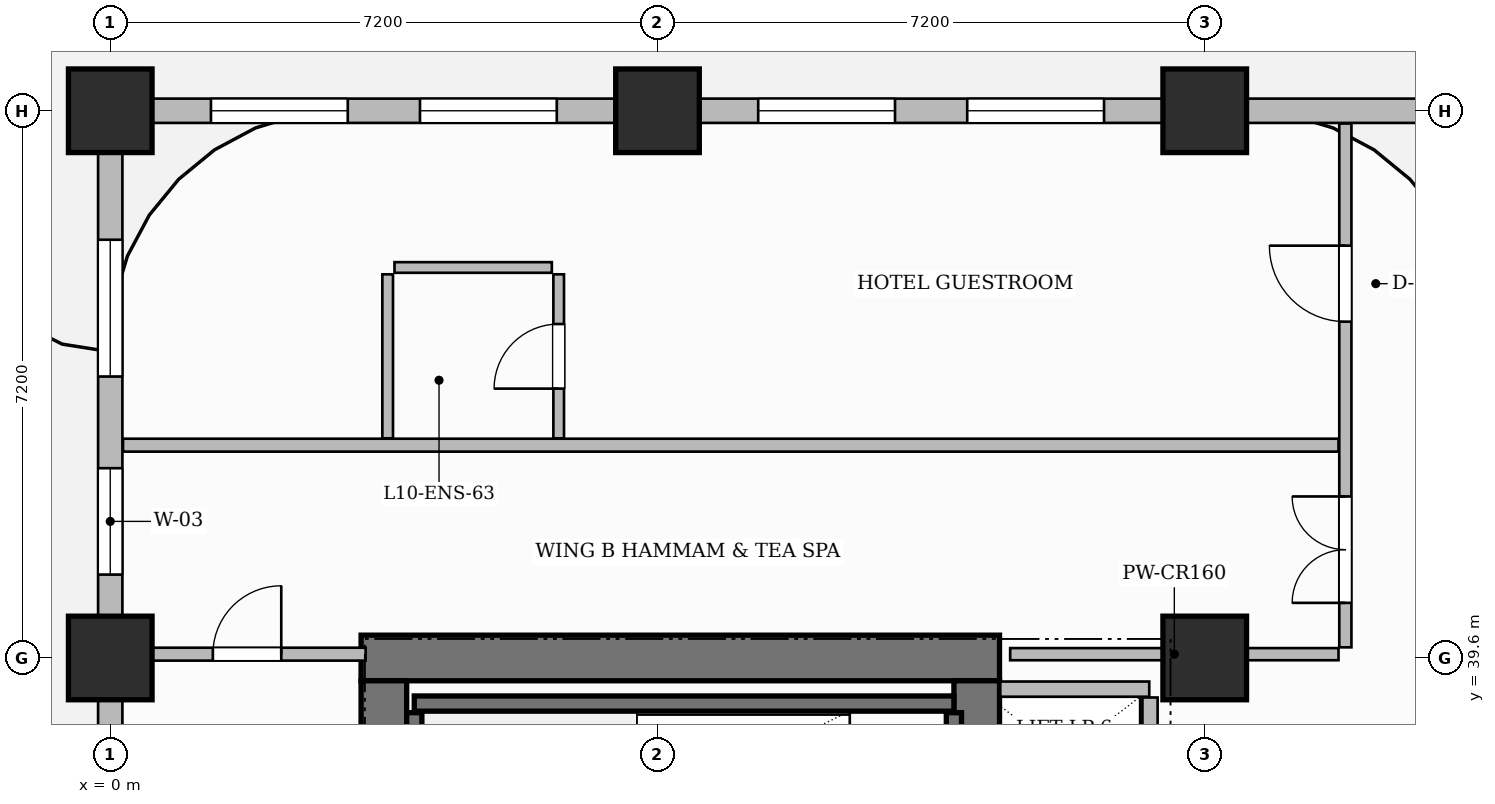
"""IFC4 building model, lengths in metres.
Left out: names, types, materials, properties, quantities, classifications, styles, units other than length and angle.
Written with IfcOpenShell. Run it as: python <this file> out.ifc"""

import sys

from ifc_helpers import new_model, si_unit, direction, frame, frame_2d, origin, origin_2d, place, context, subcontext, project, spatial, rectangle, extrude, source, transform, mapped, element, fill, save


model = new_model("IFC4")
c1 = context("Model", 3, precision=1e-05, world=origin(), true_north=direction((0.0, 1.0)))
c2 = subcontext(c1, "Body", "Model", "MODEL_VIEW")
j1 = project(units=[si_unit("LENGTHUNIT", "METRE"), si_unit("PLANEANGLEUNIT", "RADIAN")], contexts=[c1])
p1 = place(None, origin())
s1 = spatial("IfcSite", under=j1, at=p1, CompositionType="ELEMENT")
p2 = place(p1, origin())
s2 = spatial("IfcBuilding", under=s1, at=p2, CompositionType="ELEMENT")
p3 = place(p2, frame((0.0, 0.0, 47.2)))
s3 = spatial("IfcBuildingStorey", under=s2, at=p3, CompositionType="ELEMENT", Elevation=47.2)
p4 = place(p3, frame((3.3, 39.6, 0.0), z_axis=(0.0, 0.0, 1.0), x_axis=(1.0, 0.0, 0.0)))
e1 = element("IfcWall", 1, at=p4, inside=s3, PredefinedType="SHEAR", context=c2, shape_type="SweptSolid", body=[
    extrude(rectangle(XDim=8.4, YDim=0.6, at=frame_2d((4.2, 0.0))), origin(), (0.0, 0.0, 1.0), 3.7),
])
p5 = place(p3, frame((3.6, 25.5, 0.0), z_axis=(0.0, 0.0, 1.0), x_axis=(0.0, 1.0, 0.0)))
e2 = element("IfcWall", 2, at=p5, inside=s3, PredefinedType="SHEAR", context=c2, shape_type="SweptSolid", body=[
    extrude(rectangle(XDim=13.8, YDim=0.6, at=frame_2d((6.9, 0.0))), origin(), (0.0, 0.0, 1.0), 3.7),
])
p6 = place(p3, frame((11.4, 25.5, 0.0), z_axis=(0.0, 0.0, 1.0), x_axis=(0.0, 1.0, 0.0)))
e3 = element("IfcWall", 3, at=p6, inside=s3, PredefinedType="SHEAR", context=c2, shape_type="SweptSolid", body=[
    extrude(rectangle(XDim=13.8, YDim=0.6, at=frame_2d((6.9, 0.0))), origin(), (0.0, 0.0, 1.0), 3.7),
])
p7 = place(p6, frame((6.47, 0.0, 0.0)))
e4 = element("IfcOpeningElement", 4, at=p7, cuts=e3, PredefinedType="OPENING", context=c2, shape_type="SweptSolid", body=[
    extrude(rectangle(XDim=1.5, YDim=2.2, at=frame_2d((0.75, 1.1))), frame((0.0, 0.31, 0.0), z_axis=(0.0, -1.0, 0.0), x_axis=(1.0, 0.0, 0.0)), (0.0, 0.0, 1.0), 0.62),
])
m1 = source(origin(), c2, "Body", "SweptSolid", [
    extrude(rectangle(XDim=1.1, YDim=1.1, at=origin_2d()), origin(), (0.0, 0.0, 1.0), 3.7),
])
for number, where, z_axis, x_axis in (
    (5, (0.0, 39.6, 0.0), (0.0, 0.0, 1.0), (1.0, 0.0, 0.0)),
    (6, (0.0, 46.8, 0.0), (0.0, 0.0, 1.0), (1.0, 0.0, 0.0)),
    (7, (7.2, 46.8, 0.0), (0.0, 0.0, 1.0), (1.0, 0.0, 0.0)),
    (8, (14.4, 39.6, 0.0), (0.0, 0.0, 1.0), (1.0, 0.0, 0.0)),
    (9, (14.4, 46.8, 0.0), (0.0, 0.0, 1.0), (1.0, 0.0, 0.0)),
):
    element("IfcColumn", number, at=place(p3, frame(where, z_axis=z_axis, x_axis=x_axis)), inside=s3, PredefinedType="COLUMN", context=c2, shape_type="MappedRepresentation", body=[
        mapped(m1, transform((0.0, 0.0, 0.0), scale=1.0)),
    ])
p8 = place(p3, frame((4.0, 39.0, 0.0), z_axis=(0.0, 0.0, 1.0), x_axis=(1.0, 0.0, 0.0)))
e10 = element("IfcWall", 10, at=p8, inside=s3, PredefinedType="SHEAR", context=c2, shape_type="SweptSolid", body=[
    extrude(rectangle(XDim=7.1, YDim=0.2, at=frame_2d((3.55, 0.0))), origin(), (0.0, 0.0, 1.0), 3.7),
])
for number, where, z_axis, x_axis in (
    (11, (4.0, 36.18, 0.0), (0.0, 0.0, 1.0), (0.0, 1.0, 0.0)),
    (12, (11.1, 36.18, 0.0), (0.0, 0.0, 1.0), (0.0, 1.0, 0.0)),
):
    element("IfcWall", number, at=place(p3, frame(where, z_axis=z_axis, x_axis=x_axis)), inside=s3, PredefinedType="SHEAR", context=c2, shape_type="SweptSolid", body=[
        extrude(rectangle(XDim=2.7, YDim=0.2, at=frame_2d((1.35, 0.0))), origin(), (0.0, 0.0, 1.0), 3.7),
    ])
p9 = place(p3, frame((11.71, 39.19, 0.0), z_axis=(0.0, 0.0, 1.0), x_axis=(1.0, 0.0, 0.0)))
e13 = element("IfcWall", 13, at=p9, inside=s3, PredefinedType="PARTITIONING", context=c2, shape_type="SweptSolid", body=[
    extrude(rectangle(XDim=1.96, YDim=0.2, at=frame_2d((0.98, 0.0))), origin(), (0.0, 0.0, 1.0), 3.45),
])
p10 = place(p3, frame((13.68, 34.36, 0.0), z_axis=(0.0, 0.0, 1.0), x_axis=(0.0, 1.0, 0.0)))
e14 = element("IfcWall", 14, at=p10, inside=s3, PredefinedType="PARTITIONING", context=c2, shape_type="SweptSolid", body=[
    extrude(rectangle(XDim=4.72, YDim=0.2, at=frame_2d((2.36, 0.0))), origin(), (0.0, 0.0, 1.0), 3.45),
])
p11 = place(p3, frame((16.25, 39.74, 0.0), z_axis=(0.0, 0.0, 1.0), x_axis=(0.0, 1.0, 0.0)))
e15 = element("IfcWall", 15, at=p11, inside=s3, PredefinedType="PARTITIONING", context=c2, shape_type="SweptSolid", body=[
    extrude(rectangle(XDim=6.892, YDim=0.16, at=frame_2d((3.446, 0.0))), origin(), (0.0, 0.0, 1.0), 3.45),
])
p12 = place(p11, frame((0.585, 0.0, 0.0)))
e16 = element("IfcOpeningElement", 16, at=p12, cuts=e15, PredefinedType="OPENING", context=c2, shape_type="SweptSolid", body=[
    extrude(rectangle(XDim=1.4, YDim=2.35, at=frame_2d((0.7, 1.175))), frame((0.0, 0.09, 0.0), z_axis=(0.0, -1.0, 0.0), x_axis=(1.0, 0.0, 0.0)), (0.0, 0.0, 1.0), 0.18),
])
p13 = place(p11, frame((4.285, 0.0, 0.0)))
e17 = element("IfcOpeningElement", 17, at=p13, cuts=e15, PredefinedType="OPENING", context=c2, shape_type="SweptSolid", body=[
    extrude(rectangle(XDim=1.0, YDim=2.2, at=frame_2d((0.5, 1.1))), frame((0.0, 0.09, 0.0), z_axis=(0.0, -1.0, 0.0), x_axis=(1.0, 0.0, 0.0)), (0.0, 0.0, 1.0), 0.18),
])
p14 = place(p3, frame((11.84, 39.65, 0.0), z_axis=(0.0, 0.0, 1.0), x_axis=(1.0, 0.0, 0.0)))
e18 = element("IfcWall", 18, at=p14, inside=s3, PredefinedType="PARTITIONING", context=c2, shape_type="SweptSolid", body=[
    extrude(rectangle(XDim=4.32, YDim=0.16, at=frame_2d((2.16, 0.0))), origin(), (0.0, 0.0, 1.0), 2.885),
])
p15 = place(p3, frame((0.24, 39.65, 0.0), z_axis=(0.0, 0.0, 1.0), x_axis=(1.0, 0.0, 0.0)))
e19 = element("IfcWall", 19, at=p15, inside=s3, PredefinedType="PARTITIONING", context=c2, shape_type="SweptSolid", body=[
    extrude(rectangle(XDim=3.12, YDim=0.17, at=frame_2d((1.56, 0.0))), origin(), (0.0, 0.0, 1.0), 3.45),
])
p16 = place(p15, frame((1.11, 0.0, 0.0)))
e20 = element("IfcOpeningElement", 20, at=p16, cuts=e19, PredefinedType="OPENING", context=c2, shape_type="SweptSolid", body=[
    extrude(rectangle(XDim=0.9, YDim=2.15, at=frame_2d((0.45, 1.075))), frame((0.0, 0.095, 0.0), z_axis=(0.0, -1.0, 0.0), x_axis=(1.0, 0.0, 0.0)), (0.0, 0.0, 1.0), 0.19),
])
p17 = place(p3, frame((0.168, 42.4, 0.0), z_axis=(0.0, 0.0, 1.0), x_axis=(1.0, 0.0, 0.0)))
e21 = element("IfcWall", 21, at=p17, inside=s3, PredefinedType="PARTITIONING", context=c2, shape_type="SweptSolid", body=[
    extrude(rectangle(XDim=15.992, YDim=0.17, at=frame_2d((7.996, 0.0))), origin(), (0.0, 0.0, 1.0), 3.45),
])
p18 = place(p3, frame((3.65, 42.49, 0.0), z_axis=(0.0, 0.0, 1.0), x_axis=(0.0, 1.0, 0.0)))
e22 = element("IfcWall", 22, at=p18, inside=s3, PredefinedType="PARTITIONING", context=c2, shape_type="SweptSolid", body=[
    extrude(rectangle(XDim=2.158, YDim=0.14, at=frame_2d((1.079, 0.0))), origin(), (0.0, 0.0, 1.0), 3.45),
])
p19 = place(p3, frame((3.74, 44.738, 0.0), z_axis=(0.0, 0.0, 1.0), x_axis=(1.0, 0.0, 0.0)))
e23 = element("IfcWall", 23, at=p19, inside=s3, PredefinedType="PARTITIONING", context=c2, shape_type="SweptSolid", body=[
    extrude(rectangle(XDim=2.07, YDim=0.14, at=frame_2d((1.035, 0.0))), origin(), (0.0, 0.0, 1.0), 3.45),
])
p20 = place(p3, frame((5.9, 42.49, 0.0), z_axis=(0.0, 0.0, 1.0), x_axis=(0.0, 1.0, 0.0)))
e24 = element("IfcWall", 24, at=p20, inside=s3, PredefinedType="PARTITIONING", context=c2, shape_type="SweptSolid", body=[
    extrude(rectangle(XDim=2.158, YDim=0.14, at=frame_2d((1.079, 0.0))), origin(), (0.0, 0.0, 1.0), 3.45),
])
p21 = place(p20, frame((0.654, 0.0, 0.0)))
e25 = element("IfcOpeningElement", 25, at=p21, cuts=e24, PredefinedType="OPENING", context=c2, shape_type="SweptSolid", body=[
    extrude(rectangle(XDim=0.85, YDim=2.1, at=frame_2d((0.425, 1.05))), frame((0.0, 0.08, 0.0), z_axis=(0.0, -1.0, 0.0), x_axis=(1.0, 0.0, 0.0)), (0.0, 0.0, 1.0), 0.16),
])
p22 = place(p3, frame((0.0, 46.8, 0.0), z_axis=(0.0, 0.0, 1.0), x_axis=(1.0, 0.0, 0.0)))
e26 = element("IfcWall", 26, at=p22, inside=s3, PredefinedType="SOLIDWALL", context=c2, shape_type="SweptSolid", body=[
    extrude(rectangle(XDim=18.0, YDim=0.32, at=frame_2d((9.0, 0.0))), origin(), (0.0, 0.0, 1.0), 2.885),
])
p23 = place(p22, frame((1.325, 0.0, 0.8)))
e27 = element("IfcOpeningElement", 27, at=p23, cuts=e26, PredefinedType="OPENING", context=c2, shape_type="SweptSolid", body=[
    extrude(rectangle(XDim=1.8, YDim=1.85, at=frame_2d((0.9, 0.925))), frame((0.0, 0.17, 0.0), z_axis=(0.0, -1.0, 0.0), x_axis=(1.0, 0.0, 0.0)), (0.0, 0.0, 1.0), 0.34),
])
p24 = place(p22, frame((4.075, 0.0, 0.8)))
e28 = element("IfcOpeningElement", 28, at=p24, cuts=e26, PredefinedType="OPENING", context=c2, shape_type="SweptSolid", body=[
    extrude(rectangle(XDim=1.8, YDim=1.85, at=frame_2d((0.9, 0.925))), frame((0.0, 0.17, 0.0), z_axis=(0.0, -1.0, 0.0), x_axis=(1.0, 0.0, 0.0)), (0.0, 0.0, 1.0), 0.34),
])
p25 = place(p22, frame((8.525, 0.0, 0.8)))
e29 = element("IfcOpeningElement", 29, at=p25, cuts=e26, PredefinedType="OPENING", context=c2, shape_type="SweptSolid", body=[
    extrude(rectangle(XDim=1.8, YDim=1.85, at=frame_2d((0.9, 0.925))), frame((0.0, 0.17, 0.0), z_axis=(0.0, -1.0, 0.0), x_axis=(1.0, 0.0, 0.0)), (0.0, 0.0, 1.0), 0.34),
])
p26 = place(p22, frame((11.275, 0.0, 0.8)))
e30 = element("IfcOpeningElement", 30, at=p26, cuts=e26, PredefinedType="OPENING", context=c2, shape_type="SweptSolid", body=[
    extrude(rectangle(XDim=1.8, YDim=1.85, at=frame_2d((0.9, 0.925))), frame((0.0, 0.17, 0.0), z_axis=(0.0, -1.0, 0.0), x_axis=(1.0, 0.0, 0.0)), (0.0, 0.0, 1.0), 0.34),
])
p27 = place(p3, frame((0.0, 25.25, 0.0), z_axis=(0.0, 0.0, 1.0), x_axis=(0.0, 1.0, 0.0)))
e31 = element("IfcWall", 31, at=p27, inside=s3, PredefinedType="SOLIDWALL", context=c2, shape_type="SweptSolid", body=[
    extrude(rectangle(XDim=21.5, YDim=0.32, at=frame_2d((10.75, 0.0))), origin(), (0.0, 0.0, 1.0), 2.885),
])
p28 = place(p27, frame((1.275, 0.0, 0.8)))
e32 = element("IfcOpeningElement", 32, at=p28, cuts=e31, PredefinedType="OPENING", context=c2, shape_type="SweptSolid", body=[
    extrude(rectangle(XDim=1.8, YDim=1.85, at=frame_2d((0.9, 0.925))), frame((0.0, 0.17, 0.0), z_axis=(0.0, -1.0, 0.0), x_axis=(1.0, 0.0, 0.0)), (0.0, 0.0, 1.0), 0.34),
])
p29 = place(p27, frame((4.025, 0.0, 0.8)))
e33 = element("IfcOpeningElement", 33, at=p29, cuts=e31, PredefinedType="OPENING", context=c2, shape_type="SweptSolid", body=[
    extrude(rectangle(XDim=1.8, YDim=1.85, at=frame_2d((0.9, 0.925))), frame((0.0, 0.17, 0.0), z_axis=(0.0, -1.0, 0.0), x_axis=(1.0, 0.0, 0.0)), (0.0, 0.0, 1.0), 0.34),
])
p30 = place(p27, frame((8.475, 0.0, 0.8)))
e34 = element("IfcOpeningElement", 34, at=p30, cuts=e31, PredefinedType="OPENING", context=c2, shape_type="SweptSolid", body=[
    extrude(rectangle(XDim=1.8, YDim=1.85, at=frame_2d((0.9, 0.925))), frame((0.0, 0.17, 0.0), z_axis=(0.0, -1.0, 0.0), x_axis=(1.0, 0.0, 0.0)), (0.0, 0.0, 1.0), 0.34),
])
p31 = place(p27, frame((11.225, 0.0, 0.8)))
e35 = element("IfcOpeningElement", 35, at=p31, cuts=e31, PredefinedType="OPENING", context=c2, shape_type="SweptSolid", body=[
    extrude(rectangle(XDim=1.8, YDim=1.85, at=frame_2d((0.9, 0.925))), frame((0.0, 0.17, 0.0), z_axis=(0.0, -1.0, 0.0), x_axis=(1.0, 0.0, 0.0)), (0.0, 0.0, 1.0), 0.34),
])
p32 = place(p27, frame((15.447, 0.0, 0.8)))
e36 = element("IfcOpeningElement", 36, at=p32, cuts=e31, PredefinedType="OPENING", context=c2, shape_type="SweptSolid", body=[
    extrude(rectangle(XDim=1.4, YDim=1.85, at=frame_2d((0.7, 0.925))), frame((0.0, 0.17, 0.0), z_axis=(0.0, -1.0, 0.0), x_axis=(1.0, 0.0, 0.0)), (0.0, 0.0, 1.0), 0.34),
])
p33 = place(p27, frame((18.053, 0.0, 0.8)))
e37 = element("IfcOpeningElement", 37, at=p33, cuts=e31, PredefinedType="OPENING", context=c2, shape_type="SweptSolid", body=[
    extrude(rectangle(XDim=1.8, YDim=1.85, at=frame_2d((0.9, 0.925))), frame((0.0, 0.17, 0.0), z_axis=(0.0, -1.0, 0.0), x_axis=(1.0, 0.0, 0.0)), (0.0, 0.0, 1.0), 0.34),
])
m2 = source(origin(), c2, "Body", "SweptSolid", [
    extrude(rectangle(XDim=0.9, YDim=2.15, at=frame_2d((0.45, 1.075))), frame((0.0, 0.025, 0.0), z_axis=(0.0, -1.0, 0.0), x_axis=(1.0, 0.0, 0.0)), (0.0, 0.0, 1.0), 0.05),
])
p34 = place(p16, origin())
e38 = element("IfcDoor", 38, at=p34, inside=s3, OperationType="SINGLE_SWING_RIGHT", PredefinedType="DOOR", context=c2, shape_type="MappedRepresentation", body=[
    mapped(m2, transform((0.0, 0.0, 0.0), scale=1.0)),
])
fill(e20, e38)
m3 = source(origin(), c2, "Body", "SweptSolid", [
    extrude(rectangle(XDim=1.4, YDim=2.35, at=frame_2d((0.7, 1.175))), frame((0.0, 0.025, 0.0), z_axis=(0.0, -1.0, 0.0), x_axis=(1.0, 0.0, 0.0)), (0.0, 0.0, 1.0), 0.05),
])
p35 = place(p12, origin())
e39 = element("IfcDoor", 39, at=p35, inside=s3, OperationType="DOUBLE_DOOR_SINGLE_SWING", PredefinedType="DOOR", context=c2, shape_type="MappedRepresentation", body=[
    mapped(m3, transform((0.0, 0.0, 0.0), scale=1.0)),
])
fill(e16, e39)
m4 = source(origin(), c2, "Body", "SweptSolid", [
    extrude(rectangle(XDim=0.85, YDim=2.1, at=frame_2d((0.425, 1.05))), frame((0.0, 0.025, 0.0), z_axis=(0.0, -1.0, 0.0), x_axis=(1.0, 0.0, 0.0)), (0.0, 0.0, 1.0), 0.05),
])
p36 = place(p21, origin())
e40 = element("IfcDoor", 40, at=p36, inside=s3, OperationType="SINGLE_SWING_LEFT", PredefinedType="DOOR", context=c2, shape_type="MappedRepresentation", body=[
    mapped(m4, transform((0.0, 0.0, 0.0), scale=1.0)),
])
fill(e25, e40)
m5 = source(origin(), c2, "Body", "SweptSolid", [
    extrude(rectangle(XDim=1.0, YDim=2.2, at=frame_2d((0.5, 1.1))), frame((0.0, 0.025, 0.0), z_axis=(0.0, -1.0, 0.0), x_axis=(1.0, 0.0, 0.0)), (0.0, 0.0, 1.0), 0.05),
])
p37 = place(p13, origin())
e41 = element("IfcDoor", 41, at=p37, inside=s3, OperationType="SINGLE_SWING_RIGHT", PredefinedType="DOOR", context=c2, shape_type="MappedRepresentation", body=[
    mapped(m5, transform((0.0, 0.0, 0.0), scale=1.0)),
])
fill(e17, e41)
m6 = source(origin(), c2, "Body", "SweptSolid", [
    extrude(rectangle(XDim=1.8, YDim=1.85, at=frame_2d((0.9, 0.925))), frame((0.0, 0.03, 0.0), z_axis=(0.0, -1.0, 0.0), x_axis=(1.0, 0.0, 0.0)), (0.0, 0.0, 1.0), 0.06),
])
p38 = place(p23, origin())
e42 = element("IfcWindow", 42, at=p38, inside=s3, PartitioningType="DOUBLE_PANEL_VERTICAL", PredefinedType="WINDOW", context=c2, shape_type="MappedRepresentation", body=[
    mapped(m6, transform((0.0, 0.0, 0.0), scale=1.0)),
])
fill(e27, e42)
p39 = place(p24, origin())
e43 = element("IfcWindow", 43, at=p39, inside=s3, PartitioningType="DOUBLE_PANEL_VERTICAL", PredefinedType="WINDOW", context=c2, shape_type="MappedRepresentation", body=[
    mapped(m6, transform((0.0, 0.0, 0.0), scale=1.0)),
])
fill(e28, e43)
p40 = place(p25, origin())
e44 = element("IfcWindow", 44, at=p40, inside=s3, PartitioningType="DOUBLE_PANEL_VERTICAL", PredefinedType="WINDOW", context=c2, shape_type="MappedRepresentation", body=[
    mapped(m6, transform((0.0, 0.0, 0.0), scale=1.0)),
])
fill(e29, e44)
p41 = place(p26, origin())
e45 = element("IfcWindow", 45, at=p41, inside=s3, PartitioningType="DOUBLE_PANEL_VERTICAL", PredefinedType="WINDOW", context=c2, shape_type="MappedRepresentation", body=[
    mapped(m6, transform((0.0, 0.0, 0.0), scale=1.0)),
])
fill(e30, e45)
m7 = source(origin(), c2, "Body", "SweptSolid", [
    extrude(rectangle(XDim=1.4, YDim=1.85, at=frame_2d((0.7, 0.925))), frame((0.0, 0.03, 0.0), z_axis=(0.0, -1.0, 0.0), x_axis=(1.0, 0.0, 0.0)), (0.0, 0.0, 1.0), 0.06),
])
p42 = place(p32, origin())
e46 = element("IfcWindow", 46, at=p42, inside=s3, PartitioningType="SINGLE_PANEL", PredefinedType="WINDOW", context=c2, shape_type="MappedRepresentation", body=[
    mapped(m7, transform((0.0, 0.0, 0.0), scale=1.0)),
])
fill(e36, e46)
p43 = place(p33, origin())
e47 = element("IfcWindow", 47, at=p43, inside=s3, PartitioningType="DOUBLE_PANEL_VERTICAL", PredefinedType="WINDOW", context=c2, shape_type="MappedRepresentation", body=[
    mapped(m6, transform((0.0, 0.0, 0.0), scale=1.0)),
])
fill(e37, e47)
save(model, sys.argv[1])
